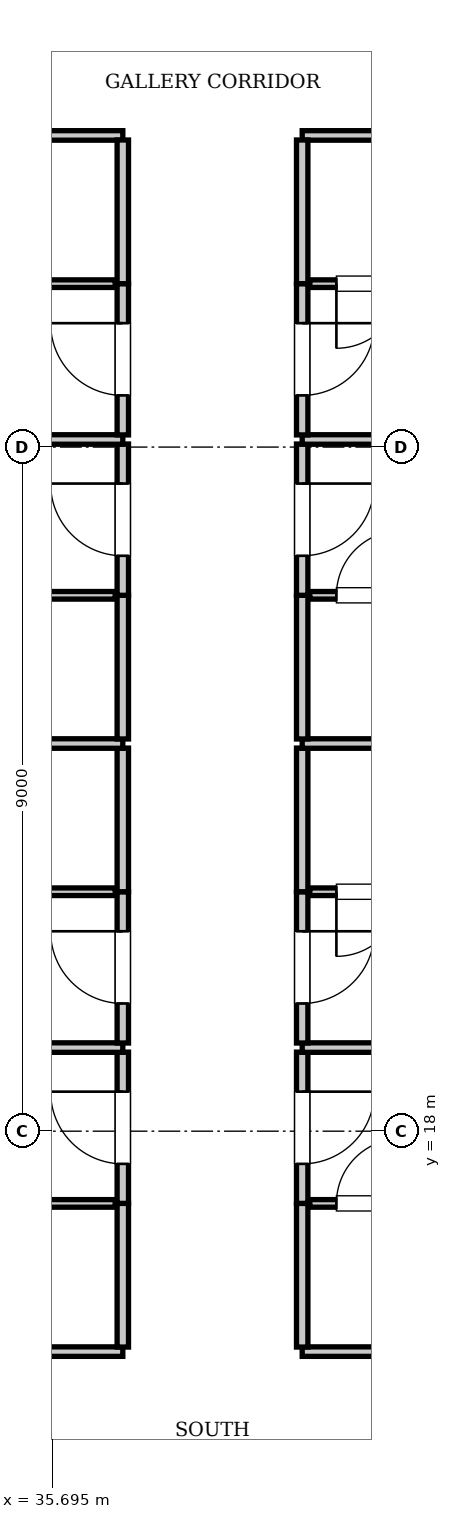
"""IFC4 building model, lengths in metres.
Left out: names, types, materials, properties, quantities, classifications, styles, units other than length and angle.
Written with IfcOpenShell. Run it as: python <this file> out.ifc"""

import sys

from ifc_helpers import new_model, si_unit, direction, frame, frame_2d, origin, place, context, subcontext, project, spatial, rectangle, extrude, element, fill, save


model = new_model("IFC4")
c1 = context("Model", 3, precision=1e-05, world=origin(), true_north=direction((0.0, 1.0)))
c2 = subcontext(c1, "Body", "Model", "MODEL_VIEW")
j1 = project(units=[si_unit("LENGTHUNIT", "METRE"), si_unit("PLANEANGLEUNIT", "RADIAN")], contexts=[c1])
p1 = place(None, origin())
s1 = spatial("IfcSite", under=j1, at=p1, CompositionType="ELEMENT")
p2 = place(p1, origin())
s2 = spatial("IfcBuilding", under=s1, at=p2, CompositionType="ELEMENT")
p3 = place(p2, frame((0.0, 0.0, 131.25)))
s3 = spatial("IfcBuildingStorey", under=s2, at=p3, CompositionType="ELEMENT", Elevation=131.25)
p4 = place(p3, frame((13.2, 15.1, 0.0), z_axis=(0.0, 0.0, 1.0), x_axis=(1.0, 0.0, 0.0)))
e1 = element("IfcWall", 1, at=p4, inside=s3, PredefinedType="PARTITIONING", context=c2, shape_type="SweptSolid", body=[
    extrude(rectangle(XDim=23.42, YDim=0.125, at=frame_2d((11.71, 0.0))), origin(), (0.0, 0.0, 1.0), 3.61),
])
p5 = place(p3, frame((38.98, 15.1, 0.0), z_axis=(0.0, 0.0, 1.0), x_axis=(1.0, 0.0, 0.0)))
e2 = element("IfcWall", 2, at=p5, inside=s3, PredefinedType="PARTITIONING", context=c2, shape_type="SweptSolid", body=[
    extrude(rectangle(XDim=23.42, YDim=0.125, at=frame_2d((11.71, 0.0))), origin(), (0.0, 0.0, 1.0), 3.61),
])
p6 = place(p3, frame((13.2, 31.1, 0.0), z_axis=(0.0, 0.0, 1.0), x_axis=(1.0, 0.0, 0.0)))
e3 = element("IfcWall", 3, at=p6, inside=s3, PredefinedType="PARTITIONING", context=c2, shape_type="SweptSolid", body=[
    extrude(rectangle(XDim=23.42, YDim=0.125, at=frame_2d((11.71, 0.0))), origin(), (0.0, 0.0, 1.0), 3.61),
])
p7 = place(p3, frame((38.98, 31.1, 0.0), z_axis=(0.0, 0.0, 1.0), x_axis=(1.0, 0.0, 0.0)))
e4 = element("IfcWall", 4, at=p7, inside=s3, PredefinedType="PARTITIONING", context=c2, shape_type="SweptSolid", body=[
    extrude(rectangle(XDim=23.42, YDim=0.125, at=frame_2d((11.71, 0.0))), origin(), (0.0, 0.0, 1.0), 3.61),
])
p8 = place(p3, frame((36.62, 15.16, 0.0), z_axis=(0.0, 0.0, 1.0), x_axis=(0.0, 1.0, 0.0)))
e5 = element("IfcWall", 5, at=p8, inside=s3, PredefinedType="PARTITIONING", context=c2, shape_type="SweptSolid", body=[
    extrude(rectangle(XDim=1.89, YDim=0.15, at=frame_2d((0.945, 0.0))), origin(), (0.0, 0.0, 1.0), 3.61),
])
p9 = place(p3, frame((36.62, 17.05, 0.0), z_axis=(0.0, 0.0, 1.0), x_axis=(0.0, 1.0, 0.0)))
e6 = element("IfcWall", 6, at=p9, inside=s3, PredefinedType="PARTITIONING", context=c2, shape_type="SweptSolid", body=[
    extrude(rectangle(XDim=1.99, YDim=0.15, at=frame_2d((0.995, 0.0))), origin(), (0.0, 0.0, 1.0), 3.61),
])
p10 = place(p9, frame((0.52, 0.0, 0.0)))
e7 = element("IfcOpeningElement", 7, at=p10, cuts=e6, PredefinedType="OPENING", context=c2, shape_type="SweptSolid", body=[
    extrude(rectangle(XDim=0.95, YDim=2.15, at=frame_2d((0.475, 1.075))), frame((0.0, 0.085, 0.0), z_axis=(0.0, -1.0, 0.0), x_axis=(1.0, 0.0, 0.0)), (0.0, 0.0, 1.0), 0.17),
])
p11 = place(p3, frame((34.22, 17.05, 0.0), z_axis=(0.0, 0.0, 1.0), x_axis=(1.0, 0.0, 0.0)))
e8 = element("IfcWall", 8, at=p11, inside=s3, PredefinedType="PARTITIONING", context=c2, shape_type="SweptSolid", body=[
    extrude(rectangle(XDim=2.3, YDim=0.1, at=frame_2d((1.15, 0.0))), origin(), (0.0, 0.0, 1.0), 3.61),
])
p12 = place(p11, frame((0.35, 0.0, 0.0)))
e9 = element("IfcOpeningElement", 9, at=p12, cuts=e8, PredefinedType="OPENING", context=c2, shape_type="SweptSolid", body=[
    extrude(rectangle(XDim=0.85, YDim=2.1, at=frame_2d((0.425, 1.05))), frame((0.0, 0.06, 0.0), z_axis=(0.0, -1.0, 0.0), x_axis=(1.0, 0.0, 0.0)), (0.0, 0.0, 1.0), 0.12),
])
p13 = place(p3, frame((38.98, 15.16, 0.0), z_axis=(0.0, 0.0, 1.0), x_axis=(0.0, 1.0, 0.0)))
e10 = element("IfcWall", 10, at=p13, inside=s3, PredefinedType="PARTITIONING", context=c2, shape_type="SweptSolid", body=[
    extrude(rectangle(XDim=1.89, YDim=0.15, at=frame_2d((0.945, 0.0))), origin(), (0.0, 0.0, 1.0), 3.61),
])
p14 = place(p3, frame((38.98, 17.05, 0.0), z_axis=(0.0, 0.0, 1.0), x_axis=(0.0, 1.0, 0.0)))
e11 = element("IfcWall", 11, at=p14, inside=s3, PredefinedType="PARTITIONING", context=c2, shape_type="SweptSolid", body=[
    extrude(rectangle(XDim=1.99, YDim=0.15, at=frame_2d((0.995, 0.0))), origin(), (0.0, 0.0, 1.0), 3.61),
])
p15 = place(p14, frame((0.52, 0.0, 0.0)))
e12 = element("IfcOpeningElement", 12, at=p15, cuts=e11, PredefinedType="OPENING", context=c2, shape_type="SweptSolid", body=[
    extrude(rectangle(XDim=0.95, YDim=2.15, at=frame_2d((0.475, 1.075))), frame((0.0, 0.085, 0.0), z_axis=(0.0, -1.0, 0.0), x_axis=(1.0, 0.0, 0.0)), (0.0, 0.0, 1.0), 0.17),
])
p16 = place(p3, frame((39.08, 17.05, 0.0), z_axis=(0.0, 0.0, 1.0), x_axis=(1.0, 0.0, 0.0)))
e13 = element("IfcWall", 13, at=p16, inside=s3, PredefinedType="PARTITIONING", context=c2, shape_type="SweptSolid", body=[
    extrude(rectangle(XDim=2.3, YDim=0.1, at=frame_2d((1.15, 0.0))), origin(), (0.0, 0.0, 1.0), 3.61),
])
p17 = place(p16, frame((0.35, 0.0, 0.0)))
e14 = element("IfcOpeningElement", 14, at=p17, cuts=e13, PredefinedType="OPENING", context=c2, shape_type="SweptSolid", body=[
    extrude(rectangle(XDim=0.85, YDim=2.1, at=frame_2d((0.425, 1.05))), frame((0.0, 0.06, 0.0), z_axis=(0.0, -1.0, 0.0), x_axis=(1.0, 0.0, 0.0)), (0.0, 0.0, 1.0), 0.12),
])
p18 = place(p3, frame((13.2, 19.1, 0.0), z_axis=(0.0, 0.0, 1.0), x_axis=(1.0, 0.0, 0.0)))
e15 = element("IfcWall", 15, at=p18, inside=s3, PredefinedType="PARTITIONING", context=c2, shape_type="SweptSolid", body=[
    extrude(rectangle(XDim=23.42, YDim=0.125, at=frame_2d((11.71, 0.0))), origin(), (0.0, 0.0, 1.0), 3.61),
])
p19 = place(p3, frame((38.98, 19.1, 0.0), z_axis=(0.0, 0.0, 1.0), x_axis=(1.0, 0.0, 0.0)))
e16 = element("IfcWall", 16, at=p19, inside=s3, PredefinedType="PARTITIONING", context=c2, shape_type="SweptSolid", body=[
    extrude(rectangle(XDim=23.42, YDim=0.125, at=frame_2d((11.71, 0.0))), origin(), (0.0, 0.0, 1.0), 3.61),
])
p20 = place(p3, frame((36.62, 19.16, 0.0), z_axis=(0.0, 0.0, 1.0), x_axis=(0.0, 1.0, 0.0)))
e17 = element("IfcWall", 17, at=p20, inside=s3, PredefinedType="PARTITIONING", context=c2, shape_type="SweptSolid", body=[
    extrude(rectangle(XDim=1.99, YDim=0.15, at=frame_2d((0.995, 0.0))), origin(), (0.0, 0.0, 1.0), 3.61),
])
p21 = place(p20, frame((0.52, 0.0, 0.0)))
e18 = element("IfcOpeningElement", 18, at=p21, cuts=e17, PredefinedType="OPENING", context=c2, shape_type="SweptSolid", body=[
    extrude(rectangle(XDim=0.95, YDim=2.15, at=frame_2d((0.475, 1.075))), frame((0.0, 0.085, 0.0), z_axis=(0.0, -1.0, 0.0), x_axis=(1.0, 0.0, 0.0)), (0.0, 0.0, 1.0), 0.17),
])
p22 = place(p3, frame((36.62, 21.15, 0.0), z_axis=(0.0, 0.0, 1.0), x_axis=(0.0, 1.0, 0.0)))
e19 = element("IfcWall", 19, at=p22, inside=s3, PredefinedType="PARTITIONING", context=c2, shape_type="SweptSolid", body=[
    extrude(rectangle(XDim=1.89, YDim=0.15, at=frame_2d((0.945, 0.0))), origin(), (0.0, 0.0, 1.0), 3.61),
])
p23 = place(p3, frame((34.22, 21.15, 0.0), z_axis=(0.0, 0.0, 1.0), x_axis=(1.0, 0.0, 0.0)))
e20 = element("IfcWall", 20, at=p23, inside=s3, PredefinedType="PARTITIONING", context=c2, shape_type="SweptSolid", body=[
    extrude(rectangle(XDim=2.3, YDim=0.1, at=frame_2d((1.15, 0.0))), origin(), (0.0, 0.0, 1.0), 3.61),
])
p24 = place(p23, frame((0.35, 0.0, 0.0)))
e21 = element("IfcOpeningElement", 21, at=p24, cuts=e20, PredefinedType="OPENING", context=c2, shape_type="SweptSolid", body=[
    extrude(rectangle(XDim=0.85, YDim=2.1, at=frame_2d((0.425, 1.05))), frame((0.0, 0.06, 0.0), z_axis=(0.0, -1.0, 0.0), x_axis=(1.0, 0.0, 0.0)), (0.0, 0.0, 1.0), 0.12),
])
p25 = place(p3, frame((38.98, 19.16, 0.0), z_axis=(0.0, 0.0, 1.0), x_axis=(0.0, 1.0, 0.0)))
e22 = element("IfcWall", 22, at=p25, inside=s3, PredefinedType="PARTITIONING", context=c2, shape_type="SweptSolid", body=[
    extrude(rectangle(XDim=1.99, YDim=0.15, at=frame_2d((0.995, 0.0))), origin(), (0.0, 0.0, 1.0), 3.61),
])
p26 = place(p25, frame((0.52, 0.0, 0.0)))
e23 = element("IfcOpeningElement", 23, at=p26, cuts=e22, PredefinedType="OPENING", context=c2, shape_type="SweptSolid", body=[
    extrude(rectangle(XDim=0.95, YDim=2.15, at=frame_2d((0.475, 1.075))), frame((0.0, 0.085, 0.0), z_axis=(0.0, -1.0, 0.0), x_axis=(1.0, 0.0, 0.0)), (0.0, 0.0, 1.0), 0.17),
])
p27 = place(p3, frame((38.98, 21.15, 0.0), z_axis=(0.0, 0.0, 1.0), x_axis=(0.0, 1.0, 0.0)))
e24 = element("IfcWall", 24, at=p27, inside=s3, PredefinedType="PARTITIONING", context=c2, shape_type="SweptSolid", body=[
    extrude(rectangle(XDim=1.89, YDim=0.15, at=frame_2d((0.945, 0.0))), origin(), (0.0, 0.0, 1.0), 3.61),
])
p28 = place(p3, frame((39.08, 21.15, 0.0), z_axis=(0.0, 0.0, 1.0), x_axis=(1.0, 0.0, 0.0)))
e25 = element("IfcWall", 25, at=p28, inside=s3, PredefinedType="PARTITIONING", context=c2, shape_type="SweptSolid", body=[
    extrude(rectangle(XDim=2.3, YDim=0.1, at=frame_2d((1.15, 0.0))), origin(), (0.0, 0.0, 1.0), 3.61),
])
p29 = place(p28, frame((0.35, 0.0, 0.0)))
e26 = element("IfcOpeningElement", 26, at=p29, cuts=e25, PredefinedType="OPENING", context=c2, shape_type="SweptSolid", body=[
    extrude(rectangle(XDim=0.85, YDim=2.1, at=frame_2d((0.425, 1.05))), frame((0.0, 0.06, 0.0), z_axis=(0.0, -1.0, 0.0), x_axis=(1.0, 0.0, 0.0)), (0.0, 0.0, 1.0), 0.12),
])
p30 = place(p3, frame((13.2, 23.1, 0.0), z_axis=(0.0, 0.0, 1.0), x_axis=(1.0, 0.0, 0.0)))
e27 = element("IfcWall", 27, at=p30, inside=s3, PredefinedType="PARTITIONING", context=c2, shape_type="SweptSolid", body=[
    extrude(rectangle(XDim=23.42, YDim=0.125, at=frame_2d((11.71, 0.0))), origin(), (0.0, 0.0, 1.0), 3.61),
])
p31 = place(p3, frame((38.98, 23.1, 0.0), z_axis=(0.0, 0.0, 1.0), x_axis=(1.0, 0.0, 0.0)))
e28 = element("IfcWall", 28, at=p31, inside=s3, PredefinedType="PARTITIONING", context=c2, shape_type="SweptSolid", body=[
    extrude(rectangle(XDim=23.42, YDim=0.125, at=frame_2d((11.71, 0.0))), origin(), (0.0, 0.0, 1.0), 3.61),
])
p32 = place(p3, frame((36.62, 23.16, 0.0), z_axis=(0.0, 0.0, 1.0), x_axis=(0.0, 1.0, 0.0)))
e29 = element("IfcWall", 29, at=p32, inside=s3, PredefinedType="PARTITIONING", context=c2, shape_type="SweptSolid", body=[
    extrude(rectangle(XDim=1.89, YDim=0.15, at=frame_2d((0.945, 0.0))), origin(), (0.0, 0.0, 1.0), 3.61),
])
p33 = place(p3, frame((36.62, 25.05, 0.0), z_axis=(0.0, 0.0, 1.0), x_axis=(0.0, 1.0, 0.0)))
e30 = element("IfcWall", 30, at=p33, inside=s3, PredefinedType="PARTITIONING", context=c2, shape_type="SweptSolid", body=[
    extrude(rectangle(XDim=1.99, YDim=0.15, at=frame_2d((0.995, 0.0))), origin(), (0.0, 0.0, 1.0), 3.61),
])
p34 = place(p33, frame((0.52, 0.0, 0.0)))
e31 = element("IfcOpeningElement", 31, at=p34, cuts=e30, PredefinedType="OPENING", context=c2, shape_type="SweptSolid", body=[
    extrude(rectangle(XDim=0.95, YDim=2.15, at=frame_2d((0.475, 1.075))), frame((0.0, 0.085, 0.0), z_axis=(0.0, -1.0, 0.0), x_axis=(1.0, 0.0, 0.0)), (0.0, 0.0, 1.0), 0.17),
])
p35 = place(p3, frame((34.22, 25.05, 0.0), z_axis=(0.0, 0.0, 1.0), x_axis=(1.0, 0.0, 0.0)))
e32 = element("IfcWall", 32, at=p35, inside=s3, PredefinedType="PARTITIONING", context=c2, shape_type="SweptSolid", body=[
    extrude(rectangle(XDim=2.3, YDim=0.1, at=frame_2d((1.15, 0.0))), origin(), (0.0, 0.0, 1.0), 3.61),
])
p36 = place(p35, frame((0.35, 0.0, 0.0)))
e33 = element("IfcOpeningElement", 33, at=p36, cuts=e32, PredefinedType="OPENING", context=c2, shape_type="SweptSolid", body=[
    extrude(rectangle(XDim=0.85, YDim=2.1, at=frame_2d((0.425, 1.05))), frame((0.0, 0.06, 0.0), z_axis=(0.0, -1.0, 0.0), x_axis=(1.0, 0.0, 0.0)), (0.0, 0.0, 1.0), 0.12),
])
p37 = place(p3, frame((38.98, 23.16, 0.0), z_axis=(0.0, 0.0, 1.0), x_axis=(0.0, 1.0, 0.0)))
e34 = element("IfcWall", 34, at=p37, inside=s3, PredefinedType="PARTITIONING", context=c2, shape_type="SweptSolid", body=[
    extrude(rectangle(XDim=1.89, YDim=0.15, at=frame_2d((0.945, 0.0))), origin(), (0.0, 0.0, 1.0), 3.61),
])
p38 = place(p3, frame((38.98, 25.05, 0.0), z_axis=(0.0, 0.0, 1.0), x_axis=(0.0, 1.0, 0.0)))
e35 = element("IfcWall", 35, at=p38, inside=s3, PredefinedType="PARTITIONING", context=c2, shape_type="SweptSolid", body=[
    extrude(rectangle(XDim=1.99, YDim=0.15, at=frame_2d((0.995, 0.0))), origin(), (0.0, 0.0, 1.0), 3.61),
])
p39 = place(p38, frame((0.52, 0.0, 0.0)))
e36 = element("IfcOpeningElement", 36, at=p39, cuts=e35, PredefinedType="OPENING", context=c2, shape_type="SweptSolid", body=[
    extrude(rectangle(XDim=0.95, YDim=2.15, at=frame_2d((0.475, 1.075))), frame((0.0, 0.085, 0.0), z_axis=(0.0, -1.0, 0.0), x_axis=(1.0, 0.0, 0.0)), (0.0, 0.0, 1.0), 0.17),
])
p40 = place(p3, frame((39.08, 25.05, 0.0), z_axis=(0.0, 0.0, 1.0), x_axis=(1.0, 0.0, 0.0)))
e37 = element("IfcWall", 37, at=p40, inside=s3, PredefinedType="PARTITIONING", context=c2, shape_type="SweptSolid", body=[
    extrude(rectangle(XDim=2.3, YDim=0.1, at=frame_2d((1.15, 0.0))), origin(), (0.0, 0.0, 1.0), 3.61),
])
p41 = place(p40, frame((0.35, 0.0, 0.0)))
e38 = element("IfcOpeningElement", 38, at=p41, cuts=e37, PredefinedType="OPENING", context=c2, shape_type="SweptSolid", body=[
    extrude(rectangle(XDim=0.85, YDim=2.1, at=frame_2d((0.425, 1.05))), frame((0.0, 0.06, 0.0), z_axis=(0.0, -1.0, 0.0), x_axis=(1.0, 0.0, 0.0)), (0.0, 0.0, 1.0), 0.12),
])
p42 = place(p3, frame((13.2, 27.1, 0.0), z_axis=(0.0, 0.0, 1.0), x_axis=(1.0, 0.0, 0.0)))
e39 = element("IfcWall", 39, at=p42, inside=s3, PredefinedType="PARTITIONING", context=c2, shape_type="SweptSolid", body=[
    extrude(rectangle(XDim=23.42, YDim=0.125, at=frame_2d((11.71, 0.0))), origin(), (0.0, 0.0, 1.0), 2.41),
])
p43 = place(p3, frame((38.98, 27.1, 0.0), z_axis=(0.0, 0.0, 1.0), x_axis=(1.0, 0.0, 0.0)))
e40 = element("IfcWall", 40, at=p43, inside=s3, PredefinedType="PARTITIONING", context=c2, shape_type="SweptSolid", body=[
    extrude(rectangle(XDim=23.42, YDim=0.125, at=frame_2d((11.71, 0.0))), origin(), (0.0, 0.0, 1.0), 2.41),
])
p44 = place(p3, frame((36.62, 27.16, 0.0), z_axis=(0.0, 0.0, 1.0), x_axis=(0.0, 1.0, 0.0)))
e41 = element("IfcWall", 41, at=p44, inside=s3, PredefinedType="PARTITIONING", context=c2, shape_type="SweptSolid", body=[
    extrude(rectangle(XDim=1.99, YDim=0.15, at=frame_2d((0.995, 0.0))), origin(), (0.0, 0.0, 1.0), 3.61),
])
p45 = place(p44, frame((0.52, 0.0, 0.0)))
e42 = element("IfcOpeningElement", 42, at=p45, cuts=e41, PredefinedType="OPENING", context=c2, shape_type="SweptSolid", body=[
    extrude(rectangle(XDim=0.95, YDim=2.15, at=frame_2d((0.475, 1.075))), frame((0.0, 0.085, 0.0), z_axis=(0.0, -1.0, 0.0), x_axis=(1.0, 0.0, 0.0)), (0.0, 0.0, 1.0), 0.17),
])
p46 = place(p3, frame((36.62, 29.15, 0.0), z_axis=(0.0, 0.0, 1.0), x_axis=(0.0, 1.0, 0.0)))
e43 = element("IfcWall", 43, at=p46, inside=s3, PredefinedType="PARTITIONING", context=c2, shape_type="SweptSolid", body=[
    extrude(rectangle(XDim=1.89, YDim=0.15, at=frame_2d((0.945, 0.0))), origin(), (0.0, 0.0, 1.0), 3.61),
])
p47 = place(p3, frame((34.22, 29.15, 0.0), z_axis=(0.0, 0.0, 1.0), x_axis=(1.0, 0.0, 0.0)))
e44 = element("IfcWall", 44, at=p47, inside=s3, PredefinedType="PARTITIONING", context=c2, shape_type="SweptSolid", body=[
    extrude(rectangle(XDim=2.3, YDim=0.1, at=frame_2d((1.15, 0.0))), origin(), (0.0, 0.0, 1.0), 3.61),
])
p48 = place(p47, frame((0.35, 0.0, 0.0)))
e45 = element("IfcOpeningElement", 45, at=p48, cuts=e44, PredefinedType="OPENING", context=c2, shape_type="SweptSolid", body=[
    extrude(rectangle(XDim=0.85, YDim=2.1, at=frame_2d((0.425, 1.05))), frame((0.0, 0.06, 0.0), z_axis=(0.0, -1.0, 0.0), x_axis=(1.0, 0.0, 0.0)), (0.0, 0.0, 1.0), 0.12),
])
p49 = place(p3, frame((38.98, 27.16, 0.0), z_axis=(0.0, 0.0, 1.0), x_axis=(0.0, 1.0, 0.0)))
e46 = element("IfcWall", 46, at=p49, inside=s3, PredefinedType="PARTITIONING", context=c2, shape_type="SweptSolid", body=[
    extrude(rectangle(XDim=1.99, YDim=0.15, at=frame_2d((0.995, 0.0))), origin(), (0.0, 0.0, 1.0), 3.61),
])
p50 = place(p49, frame((0.52, 0.0, 0.0)))
e47 = element("IfcOpeningElement", 47, at=p50, cuts=e46, PredefinedType="OPENING", context=c2, shape_type="SweptSolid", body=[
    extrude(rectangle(XDim=0.95, YDim=2.15, at=frame_2d((0.475, 1.075))), frame((0.0, 0.085, 0.0), z_axis=(0.0, -1.0, 0.0), x_axis=(1.0, 0.0, 0.0)), (0.0, 0.0, 1.0), 0.17),
])
p51 = place(p3, frame((38.98, 29.15, 0.0), z_axis=(0.0, 0.0, 1.0), x_axis=(0.0, 1.0, 0.0)))
e48 = element("IfcWall", 48, at=p51, inside=s3, PredefinedType="PARTITIONING", context=c2, shape_type="SweptSolid", body=[
    extrude(rectangle(XDim=1.89, YDim=0.15, at=frame_2d((0.945, 0.0))), origin(), (0.0, 0.0, 1.0), 3.61),
])
p52 = place(p3, frame((39.08, 29.15, 0.0), z_axis=(0.0, 0.0, 1.0), x_axis=(1.0, 0.0, 0.0)))
e49 = element("IfcWall", 49, at=p52, inside=s3, PredefinedType="PARTITIONING", context=c2, shape_type="SweptSolid", body=[
    extrude(rectangle(XDim=2.3, YDim=0.1, at=frame_2d((1.15, 0.0))), origin(), (0.0, 0.0, 1.0), 3.61),
])
p53 = place(p52, frame((0.35, 0.0, 0.0)))
e50 = element("IfcOpeningElement", 50, at=p53, cuts=e49, PredefinedType="OPENING", context=c2, shape_type="SweptSolid", body=[
    extrude(rectangle(XDim=0.85, YDim=2.1, at=frame_2d((0.425, 1.05))), frame((0.0, 0.06, 0.0), z_axis=(0.0, -1.0, 0.0), x_axis=(1.0, 0.0, 0.0)), (0.0, 0.0, 1.0), 0.12),
])
p54 = place(p10, origin())
e51 = element("IfcDoor", 51, at=p54, inside=s3, OperationType="SINGLE_SWING_RIGHT", PredefinedType="DOOR", context=c2, shape_type="SweptSolid", body=[
    extrude(rectangle(XDim=0.95, YDim=2.15, at=frame_2d((0.475, 1.075))), frame((0.0, 0.025, 0.0), z_axis=(0.0, -1.0, 0.0), x_axis=(1.0, 0.0, 0.0)), (0.0, 0.0, 1.0), 0.05),
])
fill(e7, e51)
p55 = place(p17, origin())
e52 = element("IfcDoor", 52, at=p55, inside=s3, OperationType="SINGLE_SWING_RIGHT", PredefinedType="DOOR", context=c2, shape_type="SweptSolid", body=[
    extrude(rectangle(XDim=0.85, YDim=2.1, at=frame_2d((0.425, 1.05))), frame((0.0, 0.025, 0.0), z_axis=(0.0, -1.0, 0.0), x_axis=(1.0, 0.0, 0.0)), (0.0, 0.0, 1.0), 0.05),
])
fill(e14, e52)
p56 = place(p15, frame((0.95, 0.0, 0.0), z_axis=(0.0, 0.0, 1.0), x_axis=(-1.0, 0.0, 0.0)))
e53 = element("IfcDoor", 53, at=p56, inside=s3, OperationType="SINGLE_SWING_LEFT", PredefinedType="DOOR", context=c2, shape_type="SweptSolid", body=[
    extrude(rectangle(XDim=0.95, YDim=2.15, at=frame_2d((0.475, 1.075))), frame((0.0, 0.025, 0.0), z_axis=(0.0, -1.0, 0.0), x_axis=(1.0, 0.0, 0.0)), (0.0, 0.0, 1.0), 0.05),
])
fill(e12, e53)
p57 = place(p21, origin())
e54 = element("IfcDoor", 54, at=p57, inside=s3, OperationType="SINGLE_SWING_RIGHT", PredefinedType="DOOR", context=c2, shape_type="SweptSolid", body=[
    extrude(rectangle(XDim=0.95, YDim=2.15, at=frame_2d((0.475, 1.075))), frame((0.0, 0.025, 0.0), z_axis=(0.0, -1.0, 0.0), x_axis=(1.0, 0.0, 0.0)), (0.0, 0.0, 1.0), 0.05),
])
fill(e18, e54)
p58 = place(p29, frame((0.85, 0.0, 0.0), z_axis=(0.0, 0.0, 1.0), x_axis=(-1.0, 0.0, 0.0)))
e55 = element("IfcDoor", 55, at=p58, inside=s3, OperationType="SINGLE_SWING_RIGHT", PredefinedType="DOOR", context=c2, shape_type="SweptSolid", body=[
    extrude(rectangle(XDim=0.85, YDim=2.1, at=frame_2d((0.425, 1.05))), frame((0.0, 0.025, 0.0), z_axis=(0.0, -1.0, 0.0), x_axis=(1.0, 0.0, 0.0)), (0.0, 0.0, 1.0), 0.05),
])
fill(e26, e55)
p59 = place(p26, frame((0.95, 0.0, 0.0), z_axis=(0.0, 0.0, 1.0), x_axis=(-1.0, 0.0, 0.0)))
e56 = element("IfcDoor", 56, at=p59, inside=s3, OperationType="SINGLE_SWING_LEFT", PredefinedType="DOOR", context=c2, shape_type="SweptSolid", body=[
    extrude(rectangle(XDim=0.95, YDim=2.15, at=frame_2d((0.475, 1.075))), frame((0.0, 0.025, 0.0), z_axis=(0.0, -1.0, 0.0), x_axis=(1.0, 0.0, 0.0)), (0.0, 0.0, 1.0), 0.05),
])
fill(e23, e56)
p60 = place(p34, origin())
e57 = element("IfcDoor", 57, at=p60, inside=s3, OperationType="SINGLE_SWING_RIGHT", PredefinedType="DOOR", context=c2, shape_type="SweptSolid", body=[
    extrude(rectangle(XDim=0.95, YDim=2.15, at=frame_2d((0.475, 1.075))), frame((0.0, 0.025, 0.0), z_axis=(0.0, -1.0, 0.0), x_axis=(1.0, 0.0, 0.0)), (0.0, 0.0, 1.0), 0.05),
])
fill(e31, e57)
p61 = place(p41, origin())
e58 = element("IfcDoor", 58, at=p61, inside=s3, OperationType="SINGLE_SWING_RIGHT", PredefinedType="DOOR", context=c2, shape_type="SweptSolid", body=[
    extrude(rectangle(XDim=0.85, YDim=2.1, at=frame_2d((0.425, 1.05))), frame((0.0, 0.025, 0.0), z_axis=(0.0, -1.0, 0.0), x_axis=(1.0, 0.0, 0.0)), (0.0, 0.0, 1.0), 0.05),
])
fill(e38, e58)
p62 = place(p39, frame((0.95, 0.0, 0.0), z_axis=(0.0, 0.0, 1.0), x_axis=(-1.0, 0.0, 0.0)))
e59 = element("IfcDoor", 59, at=p62, inside=s3, OperationType="SINGLE_SWING_LEFT", PredefinedType="DOOR", context=c2, shape_type="SweptSolid", body=[
    extrude(rectangle(XDim=0.95, YDim=2.15, at=frame_2d((0.475, 1.075))), frame((0.0, 0.025, 0.0), z_axis=(0.0, -1.0, 0.0), x_axis=(1.0, 0.0, 0.0)), (0.0, 0.0, 1.0), 0.05),
])
fill(e36, e59)
p63 = place(p45, origin())
e60 = element("IfcDoor", 60, at=p63, inside=s3, OperationType="SINGLE_SWING_RIGHT", PredefinedType="DOOR", context=c2, shape_type="SweptSolid", body=[
    extrude(rectangle(XDim=0.95, YDim=2.15, at=frame_2d((0.475, 1.075))), frame((0.0, 0.025, 0.0), z_axis=(0.0, -1.0, 0.0), x_axis=(1.0, 0.0, 0.0)), (0.0, 0.0, 1.0), 0.05),
])
fill(e42, e60)
p64 = place(p53, frame((0.85, 0.0, 0.0), z_axis=(0.0, 0.0, 1.0), x_axis=(-1.0, 0.0, 0.0)))
e61 = element("IfcDoor", 61, at=p64, inside=s3, OperationType="SINGLE_SWING_RIGHT", PredefinedType="DOOR", context=c2, shape_type="SweptSolid", body=[
    extrude(rectangle(XDim=0.85, YDim=2.1, at=frame_2d((0.425, 1.05))), frame((0.0, 0.025, 0.0), z_axis=(0.0, -1.0, 0.0), x_axis=(1.0, 0.0, 0.0)), (0.0, 0.0, 1.0), 0.05),
])
fill(e50, e61)
p65 = place(p50, frame((0.95, 0.0, 0.0), z_axis=(0.0, 0.0, 1.0), x_axis=(-1.0, 0.0, 0.0)))
e62 = element("IfcDoor", 62, at=p65, inside=s3, OperationType="SINGLE_SWING_LEFT", PredefinedType="DOOR", context=c2, shape_type="SweptSolid", body=[
    extrude(rectangle(XDim=0.95, YDim=2.15, at=frame_2d((0.475, 1.075))), frame((0.0, 0.025, 0.0), z_axis=(0.0, -1.0, 0.0), x_axis=(1.0, 0.0, 0.0)), (0.0, 0.0, 1.0), 0.05),
])
fill(e47, e62)
save(model, sys.argv[1])
